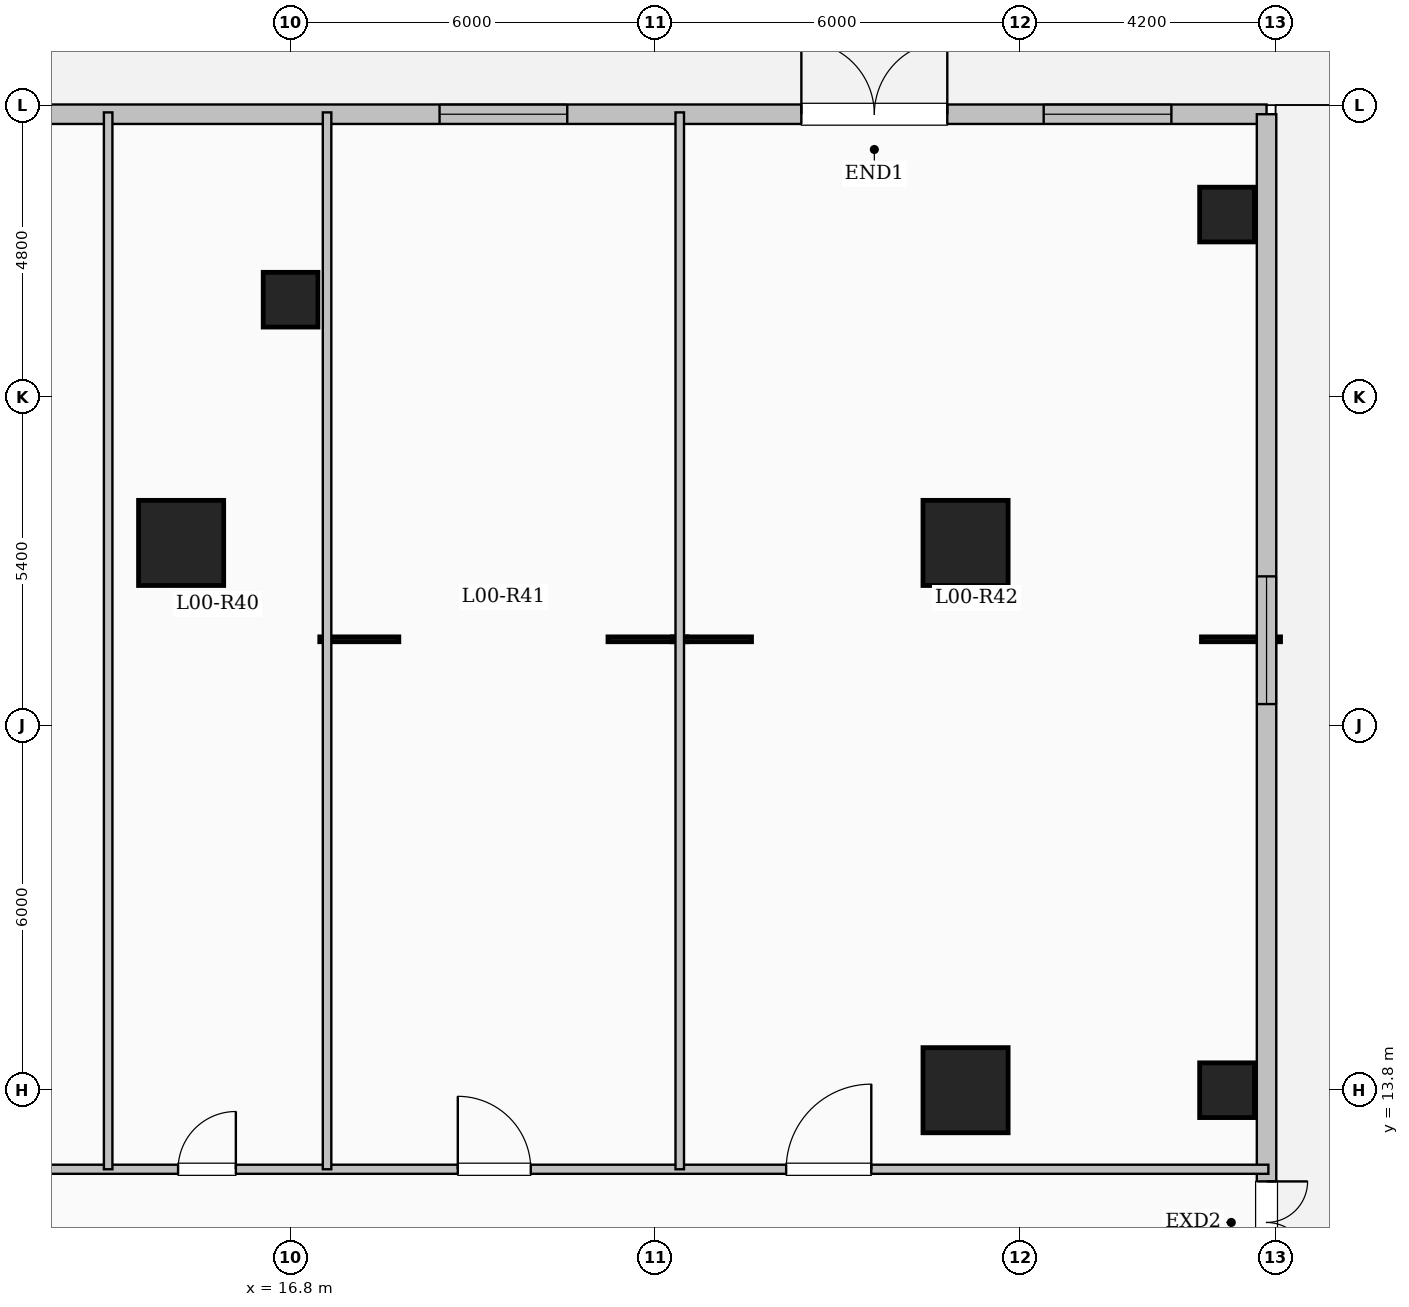
"""IFC4 building model, lengths in metres.
Left out: names, types, materials, properties, quantities, classifications, styles, units other than length and angle.
Written with IfcOpenShell. Run it as: python <this file> out.ifc"""

import sys

from ifc_helpers import new_model, si_unit, direction, frame, frame_2d, origin, origin_2d, place, context, subcontext, project, spatial, rectangle, extrude, element, fill, save


model = new_model("IFC4")
c1 = context("Model", 3, precision=1e-05, world=origin(), true_north=direction((0.0, 1.0)))
c2 = subcontext(c1, "Body", "Model", "MODEL_VIEW")
j1 = project(units=[si_unit("LENGTHUNIT", "METRE"), si_unit("PLANEANGLEUNIT", "RADIAN")], contexts=[c1])
p1 = place(None, origin())
s1 = spatial("IfcSite", under=j1, at=p1, CompositionType="ELEMENT")
p2 = place(p1, origin())
s2 = spatial("IfcBuilding", under=s1, at=p2, CompositionType="ELEMENT")
p3 = place(p2, origin())
s3 = spatial("IfcBuildingStorey", under=s2, at=p3, CompositionType="ELEMENT", Elevation=0.0)
for number, where, z_axis, x_axis in (
    (1, (32.2, 13.8, 0.0), (0.0, 0.0, 1.0), (1.0, 0.0, 0.0)),
    (2, (32.2, 28.2, 0.0), (0.0, 0.0, 1.0), (1.0, 0.0, 0.0)),
    (3, (16.8, 26.8, 0.0), (0.0, 0.0, 1.0), (1.0, 0.0, 0.0)),
):
    element("IfcColumn", number, at=place(p3, frame(where, z_axis=z_axis, x_axis=x_axis)), inside=s3, PredefinedType="COLUMN", context=c2, shape_type="SweptSolid", body=[
        extrude(rectangle(XDim=0.9, YDim=0.9, at=origin_2d()), origin(), (0.0, 0.0, 1.0), 5.4),
    ])
for number, where, z_axis, x_axis in (
    (4, (15.0, 22.8, 0.0), (0.0, 0.0, 1.0), (1.0, 0.0, 0.0)),
    (5, (27.9, 22.8, 0.0), (0.0, 0.0, 1.0), (1.0, 0.0, 0.0)),
    (6, (27.9, 13.8, 0.0), (0.0, 0.0, 1.0), (1.0, 0.0, 0.0)),
):
    element("IfcColumn", number, at=place(p3, frame(where, z_axis=z_axis, x_axis=x_axis)), inside=s3, PredefinedType="COLUMN", context=c2, shape_type="SweptSolid", body=[
        extrude(rectangle(XDim=1.4, YDim=1.4, at=origin_2d()), origin(), (0.0, 0.0, 1.0), 5.4),
    ])
p4 = place(p3, frame((-32.85, 29.85, 0.0), z_axis=(0.0, 0.0, 1.0), x_axis=(1.0, 0.0, 0.0)))
e7 = element("IfcWall", 7, at=p4, inside=s3, PredefinedType="SOLIDWALL", context=c2, shape_type="SweptSolid", body=[
    extrude(rectangle(XDim=65.7, YDim=0.32, at=frame_2d((32.85, 0.0))), origin(), (0.0, 0.0, 1.0), 5.1),
])
p5 = place(p4, frame((30.05, 0.0, 0.0)))
e8 = element("IfcOpeningElement", 8, at=p5, cuts=e7, PredefinedType="OPENING", context=c2, shape_type="SweptSolid", body=[
    extrude(rectangle(XDim=2.0, YDim=2.4, at=frame_2d((1.0, 1.2))), frame((0.0, 0.17, 0.0), z_axis=(0.0, -1.0, 0.0), x_axis=(1.0, 0.0, 0.0)), (0.0, 0.0, 1.0), 0.34),
])
p6 = place(p4, frame((33.65, 0.0, 0.0)))
e9 = element("IfcOpeningElement", 9, at=p6, cuts=e7, PredefinedType="OPENING", context=c2, shape_type="SweptSolid", body=[
    extrude(rectangle(XDim=2.0, YDim=2.4, at=frame_2d((1.0, 1.2))), frame((0.0, 0.17, 0.0), z_axis=(0.0, -1.0, 0.0), x_axis=(1.0, 0.0, 0.0)), (0.0, 0.0, 1.0), 0.34),
])
p7 = place(p4, frame((39.35, 0.0, 0.0)))
e10 = element("IfcOpeningElement", 10, at=p7, cuts=e7, PredefinedType="OPENING", context=c2, shape_type="SweptSolid", body=[
    extrude(rectangle(XDim=1.1, YDim=2.2, at=frame_2d((0.55, 1.1))), frame((0.0, 0.17, 0.0), z_axis=(0.0, -1.0, 0.0), x_axis=(1.0, 0.0, 0.0)), (0.0, 0.0, 1.0), 0.34),
])
p8 = place(p4, frame((58.05, 0.0, 0.0)))
e11 = element("IfcOpeningElement", 11, at=p8, cuts=e7, PredefinedType="OPENING", context=c2, shape_type="SweptSolid", body=[
    extrude(rectangle(XDim=2.4, YDim=2.6, at=frame_2d((1.2, 1.3))), frame((0.0, 0.17, 0.0), z_axis=(0.0, -1.0, 0.0), x_axis=(1.0, 0.0, 0.0)), (0.0, 0.0, 1.0), 0.34),
])
p9 = place(p4, frame((7.325, 0.0, 0.9)))
e12 = element("IfcOpeningElement", 12, at=p9, cuts=e7, PredefinedType="OPENING", context=c2, shape_type="SweptSolid", body=[
    extrude(rectangle(XDim=2.1, YDim=2.0, at=frame_2d((1.05, 1.0))), frame((0.0, 0.17, 0.0), z_axis=(0.0, -1.0, 0.0), x_axis=(1.0, 0.0, 0.0)), (0.0, 0.0, 1.0), 0.34),
])
p10 = place(p4, frame((21.875, 0.0, 0.9)))
e13 = element("IfcOpeningElement", 13, at=p10, cuts=e7, PredefinedType="OPENING", context=c2, shape_type="SweptSolid", body=[
    extrude(rectangle(XDim=2.1, YDim=2.0, at=frame_2d((1.05, 1.0))), frame((0.0, 0.17, 0.0), z_axis=(0.0, -1.0, 0.0), x_axis=(1.0, 0.0, 0.0)), (0.0, 0.0, 1.0), 0.34),
])
p11 = place(p4, frame((36.135, 0.0, 0.9)))
e14 = element("IfcOpeningElement", 14, at=p11, cuts=e7, PredefinedType="OPENING", context=c2, shape_type="SweptSolid", body=[
    extrude(rectangle(XDim=1.7, YDim=1.9, at=frame_2d((0.85, 0.95))), frame((0.0, 0.17, 0.0), z_axis=(0.0, -1.0, 0.0), x_axis=(1.0, 0.0, 0.0)), (0.0, 0.0, 1.0), 0.34),
])
p12 = place(p4, frame((40.86, 0.0, 0.9)))
e15 = element("IfcOpeningElement", 15, at=p12, cuts=e7, PredefinedType="OPENING", context=c2, shape_type="SweptSolid", body=[
    extrude(rectangle(XDim=1.7, YDim=1.9, at=frame_2d((0.85, 0.95))), frame((0.0, 0.17, 0.0), z_axis=(0.0, -1.0, 0.0), x_axis=(1.0, 0.0, 0.0)), (0.0, 0.0, 1.0), 0.34),
])
p13 = place(p4, frame((52.1, 0.0, 0.9)))
e16 = element("IfcOpeningElement", 16, at=p13, cuts=e7, PredefinedType="OPENING", context=c2, shape_type="SweptSolid", body=[
    extrude(rectangle(XDim=2.1, YDim=2.0, at=frame_2d((1.05, 1.0))), frame((0.0, 0.17, 0.0), z_axis=(0.0, -1.0, 0.0), x_axis=(1.0, 0.0, 0.0)), (0.0, 0.0, 1.0), 0.34),
])
p14 = place(p4, frame((62.035, 0.0, 0.9)))
e17 = element("IfcOpeningElement", 17, at=p14, cuts=e7, PredefinedType="OPENING", context=c2, shape_type="SweptSolid", body=[
    extrude(rectangle(XDim=2.1, YDim=2.0, at=frame_2d((1.05, 1.0))), frame((0.0, 0.17, 0.0), z_axis=(0.0, -1.0, 0.0), x_axis=(1.0, 0.0, 0.0)), (0.0, 0.0, 1.0), 0.34),
])
p15 = place(p3, frame((32.85, 29.85, 0.0), z_axis=(0.0, 0.0, 1.0), x_axis=(0.0, -1.0, 0.0)))
e18 = element("IfcWall", 18, at=p15, inside=s3, PredefinedType="SOLIDWALL", context=c2, shape_type="SweptSolid", body=[
    extrude(rectangle(XDim=59.7, YDim=0.32, at=frame_2d((29.85, 0.0))), origin(), (0.0, 0.0, 1.0), 5.1),
])
p16 = place(p15, frame((17.55, 0.0, 0.0)))
e19 = element("IfcOpeningElement", 19, at=p16, cuts=e18, PredefinedType="OPENING", context=c2, shape_type="SweptSolid", body=[
    extrude(rectangle(XDim=1.35, YDim=2.2, at=frame_2d((0.675, 1.1))), frame((0.0, 0.17, 0.0), z_axis=(0.0, -1.0, 0.0), x_axis=(1.0, 0.0, 0.0)), (0.0, 0.0, 1.0), 0.34),
])
p17 = place(p15, frame((46.65, 0.0, 0.0)))
e20 = element("IfcOpeningElement", 20, at=p17, cuts=e18, PredefinedType="OPENING", context=c2, shape_type="SweptSolid", body=[
    extrude(rectangle(XDim=2.0, YDim=2.4, at=frame_2d((1.0, 1.2))), frame((0.0, 0.17, 0.0), z_axis=(0.0, -1.0, 0.0), x_axis=(1.0, 0.0, 0.0)), (0.0, 0.0, 1.0), 0.34),
])
p18 = place(p15, frame((24.35, 0.0, 0.0)))
e21 = element("IfcOpeningElement", 21, at=p18, cuts=e18, PredefinedType="OPENING", context=c2, shape_type="SweptSolid", body=[
    extrude(rectangle(XDim=3.0, YDim=2.8, at=frame_2d((1.5, 1.4))), frame((0.0, 0.17, 0.0), z_axis=(0.0, -1.0, 0.0), x_axis=(1.0, 0.0, 0.0)), (0.0, 0.0, 1.0), 0.34),
])
p19 = place(p15, frame((7.6, 0.0, 0.9)))
e22 = element("IfcOpeningElement", 22, at=p19, cuts=e18, PredefinedType="OPENING", context=c2, shape_type="SweptSolid", body=[
    extrude(rectangle(XDim=2.1, YDim=2.0, at=frame_2d((1.05, 1.0))), frame((0.0, 0.17, 0.0), z_axis=(0.0, -1.0, 0.0), x_axis=(1.0, 0.0, 0.0)), (0.0, 0.0, 1.0), 0.34),
])
p20 = place(p15, frame((37.758, 0.0, 0.9)))
e23 = element("IfcOpeningElement", 23, at=p20, cuts=e18, PredefinedType="OPENING", context=c2, shape_type="SweptSolid", body=[
    extrude(rectangle(XDim=1.7, YDim=1.9, at=frame_2d((0.85, 0.95))), frame((0.0, 0.17, 0.0), z_axis=(0.0, -1.0, 0.0), x_axis=(1.0, 0.0, 0.0)), (0.0, 0.0, 1.0), 0.34),
])
p21 = place(p15, frame((42.415, 0.0, 0.9)))
e24 = element("IfcOpeningElement", 24, at=p21, cuts=e18, PredefinedType="OPENING", context=c2, shape_type="SweptSolid", body=[
    extrude(rectangle(XDim=2.1, YDim=2.0, at=frame_2d((1.05, 1.0))), frame((0.0, 0.17, 0.0), z_axis=(0.0, -1.0, 0.0), x_axis=(1.0, 0.0, 0.0)), (0.0, 0.0, 1.0), 0.34),
])
p22 = place(p15, frame((55.2, 0.0, 0.9)))
e25 = element("IfcOpeningElement", 25, at=p22, cuts=e18, PredefinedType="OPENING", context=c2, shape_type="SweptSolid", body=[
    extrude(rectangle(XDim=2.1, YDim=2.0, at=frame_2d((1.05, 1.0))), frame((0.0, 0.17, 0.0), z_axis=(0.0, -1.0, 0.0), x_axis=(1.0, 0.0, 0.0)), (0.0, 0.0, 1.0), 0.34),
])
p23 = place(p3, frame((3.85, 12.5, 0.0), z_axis=(0.0, 0.0, 1.0), x_axis=(1.0, 0.0, 0.0)))
e26 = element("IfcWall", 26, at=p23, inside=s3, PredefinedType="PARTITIONING", context=c2, shape_type="SweptSolid", body=[
    extrude(rectangle(XDim=29.03, YDim=0.15, at=frame_2d((14.515, 0.0))), origin(), (0.0, 0.0, 1.0), 5.1),
])
p24 = place(p23, frame((0.45, 0.0, 0.0)))
e27 = element("IfcOpeningElement", 27, at=p24, cuts=e26, PredefinedType="OPENING", context=c2, shape_type="SweptSolid", body=[
    extrude(rectangle(XDim=1.0, YDim=2.15, at=frame_2d((0.5, 1.075))), frame((0.0, 0.085, 0.0), z_axis=(0.0, -1.0, 0.0), x_axis=(1.0, 0.0, 0.0)), (0.0, 0.0, 1.0), 0.17),
])
p25 = place(p23, frame((2.6, 0.0, 0.0)))
e28 = element("IfcOpeningElement", 28, at=p25, cuts=e26, PredefinedType="OPENING", context=c2, shape_type="SweptSolid", body=[
    extrude(rectangle(XDim=1.0, YDim=2.15, at=frame_2d((0.5, 1.075))), frame((0.0, 0.085, 0.0), z_axis=(0.0, -1.0, 0.0), x_axis=(1.0, 0.0, 0.0)), (0.0, 0.0, 1.0), 0.17),
])
p26 = place(p23, frame((7.5, 0.0, 0.0)))
e29 = element("IfcOpeningElement", 29, at=p26, cuts=e26, PredefinedType="OPENING", context=c2, shape_type="SweptSolid", body=[
    extrude(rectangle(XDim=0.95, YDim=2.15, at=frame_2d((0.475, 1.075))), frame((0.0, 0.085, 0.0), z_axis=(0.0, -1.0, 0.0), x_axis=(1.0, 0.0, 0.0)), (0.0, 0.0, 1.0), 0.17),
])
p27 = place(p23, frame((11.1, 0.0, 0.0)))
e30 = element("IfcOpeningElement", 30, at=p27, cuts=e26, PredefinedType="OPENING", context=c2, shape_type="SweptSolid", body=[
    extrude(rectangle(XDim=0.95, YDim=2.15, at=frame_2d((0.475, 1.075))), frame((0.0, 0.085, 0.0), z_axis=(0.0, -1.0, 0.0), x_axis=(1.0, 0.0, 0.0)), (0.0, 0.0, 1.0), 0.17),
])
p28 = place(p23, frame((15.7, 0.0, 0.0)))
e31 = element("IfcOpeningElement", 31, at=p28, cuts=e26, PredefinedType="OPENING", context=c2, shape_type="SweptSolid", body=[
    extrude(rectangle(XDim=1.2, YDim=2.15, at=frame_2d((0.6, 1.075))), frame((0.0, 0.085, 0.0), z_axis=(0.0, -1.0, 0.0), x_axis=(1.0, 0.0, 0.0)), (0.0, 0.0, 1.0), 0.17),
])
p29 = place(p23, frame((21.1, 0.0, 0.0)))
e32 = element("IfcOpeningElement", 32, at=p29, cuts=e26, PredefinedType="OPENING", context=c2, shape_type="SweptSolid", body=[
    extrude(rectangle(XDim=1.4, YDim=2.2, at=frame_2d((0.7, 1.1))), frame((0.0, 0.085, 0.0), z_axis=(0.0, -1.0, 0.0), x_axis=(1.0, 0.0, 0.0)), (0.0, 0.0, 1.0), 0.17),
])
p30 = place(p3, frame((13.8, 12.5, 0.0), z_axis=(0.0, 0.0, 1.0), x_axis=(0.0, 1.0, 0.0)))
e33 = element("IfcWall", 33, at=p30, inside=s3, PredefinedType="PARTITIONING", context=c2, shape_type="SweptSolid", body=[
    extrude(rectangle(XDim=17.38, YDim=0.14, at=frame_2d((8.69, 0.0))), origin(), (0.0, 0.0, 1.0), 5.1),
])
p31 = place(p3, frame((17.4, 12.5, 0.0), z_axis=(0.0, 0.0, 1.0), x_axis=(0.0, 1.0, 0.0)))
e34 = element("IfcWall", 34, at=p31, inside=s3, PredefinedType="PARTITIONING", context=c2, shape_type="SweptSolid", body=[
    extrude(rectangle(XDim=17.38, YDim=0.14, at=frame_2d((8.69, 0.0))), origin(), (0.0, 0.0, 1.0), 4.285),
])
p32 = place(p3, frame((23.2, 12.5, 0.0), z_axis=(0.0, 0.0, 1.0), x_axis=(0.0, 1.0, 0.0)))
e35 = element("IfcWall", 35, at=p32, inside=s3, PredefinedType="PARTITIONING", context=c2, shape_type="SweptSolid", body=[
    extrude(rectangle(XDim=17.38, YDim=0.14, at=frame_2d((8.69, 0.0))), origin(), (0.0, 0.0, 1.0), 5.1),
])
p33 = place(p8, origin())
e36 = element("IfcDoor", 36, at=p33, inside=s3, OperationType="DOUBLE_DOOR_SINGLE_SWING", PredefinedType="DOOR", context=c2, shape_type="SweptSolid", body=[
    extrude(rectangle(XDim=2.4, YDim=2.6, at=frame_2d((1.2, 1.3))), frame((0.0, 0.025, 0.0), z_axis=(0.0, -1.0, 0.0), x_axis=(1.0, 0.0, 0.0)), (0.0, 0.0, 1.0), 0.05),
])
fill(e11, e36)
p34 = place(p13, origin())
e37 = element("IfcWindow", 37, at=p34, inside=s3, PartitioningType="SINGLE_PANEL", PredefinedType="WINDOW", context=c2, shape_type="SweptSolid", body=[
    extrude(rectangle(XDim=2.1, YDim=2.0, at=frame_2d((1.05, 1.0))), frame((0.0, 0.03, 0.0), z_axis=(0.0, -1.0, 0.0), x_axis=(1.0, 0.0, 0.0)), (0.0, 0.0, 1.0), 0.06),
])
fill(e16, e37)
p35 = place(p14, origin())
e38 = element("IfcWindow", 38, at=p35, inside=s3, PartitioningType="SINGLE_PANEL", PredefinedType="WINDOW", context=c2, shape_type="SweptSolid", body=[
    extrude(rectangle(XDim=2.1, YDim=2.0, at=frame_2d((1.05, 1.0))), frame((0.0, 0.03, 0.0), z_axis=(0.0, -1.0, 0.0), x_axis=(1.0, 0.0, 0.0)), (0.0, 0.0, 1.0), 0.06),
])
fill(e17, e38)
p36 = place(p16, origin())
e39 = element("IfcDoor", 39, at=p36, inside=s3, OperationType="DOUBLE_DOOR_SINGLE_SWING", PredefinedType="DOOR", context=c2, shape_type="SweptSolid", body=[
    extrude(rectangle(XDim=1.35, YDim=2.2, at=frame_2d((0.675, 1.1))), frame((0.0, 0.025, 0.0), z_axis=(0.0, -1.0, 0.0), x_axis=(1.0, 0.0, 0.0)), (0.0, 0.0, 1.0), 0.05),
])
fill(e19, e39)
p37 = place(p19, origin())
e40 = element("IfcWindow", 40, at=p37, inside=s3, PartitioningType="SINGLE_PANEL", PredefinedType="WINDOW", context=c2, shape_type="SweptSolid", body=[
    extrude(rectangle(XDim=2.1, YDim=2.0, at=frame_2d((1.05, 1.0))), frame((0.0, 0.03, 0.0), z_axis=(0.0, -1.0, 0.0), x_axis=(1.0, 0.0, 0.0)), (0.0, 0.0, 1.0), 0.06),
])
fill(e22, e40)
p38 = place(p27, origin())
e41 = element("IfcDoor", 41, at=p38, inside=s3, OperationType="SINGLE_SWING_RIGHT", PredefinedType="DOOR", context=c2, shape_type="SweptSolid", body=[
    extrude(rectangle(XDim=0.95, YDim=2.15, at=frame_2d((0.475, 1.075))), frame((0.0, 0.025, 0.0), z_axis=(0.0, -1.0, 0.0), x_axis=(1.0, 0.0, 0.0)), (0.0, 0.0, 1.0), 0.05),
])
fill(e30, e41)
p39 = place(p28, origin())
e42 = element("IfcDoor", 42, at=p39, inside=s3, OperationType="SINGLE_SWING_LEFT", PredefinedType="DOOR", context=c2, shape_type="SweptSolid", body=[
    extrude(rectangle(XDim=1.2, YDim=2.15, at=frame_2d((0.6, 1.075))), frame((0.0, 0.025, 0.0), z_axis=(0.0, -1.0, 0.0), x_axis=(1.0, 0.0, 0.0)), (0.0, 0.0, 1.0), 0.05),
])
fill(e31, e42)
p40 = place(p29, origin())
e43 = element("IfcDoor", 43, at=p40, inside=s3, OperationType="SINGLE_SWING_RIGHT", PredefinedType="DOOR", context=c2, shape_type="SweptSolid", body=[
    extrude(rectangle(XDim=1.4, YDim=2.2, at=frame_2d((0.7, 1.1))), frame((0.0, 0.025, 0.0), z_axis=(0.0, -1.0, 0.0), x_axis=(1.0, 0.0, 0.0)), (0.0, 0.0, 1.0), 0.05),
])
fill(e32, e43)
save(model, sys.argv[1])
